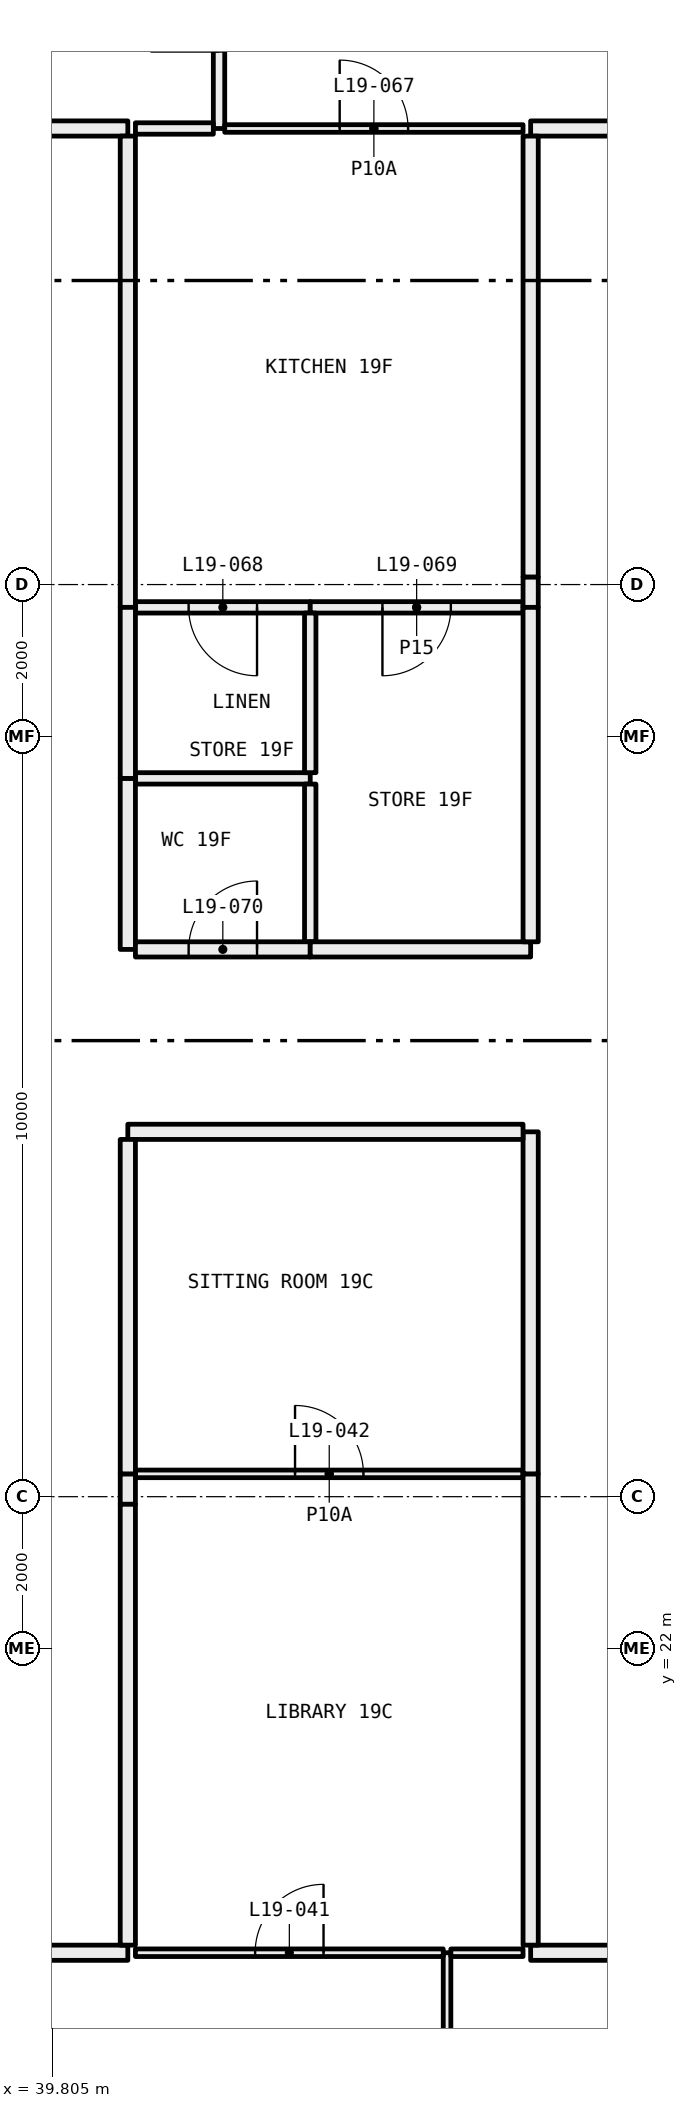
"""IFC4 building model, lengths in metres.
Left out: names, types, materials, properties, quantities, classifications, styles, units other than length and angle.
Written with IfcOpenShell. Run it as: python <this file> out.ifc"""

import sys

from ifc_helpers import new_model, si_unit, direction, frame, frame_2d, origin, place, context, subcontext, project, spatial, rectangle, extrude, element, fill, save


model = new_model("IFC4")
c1 = context("Model", 3, precision=1e-05, world=origin(), true_north=direction((0.0, 1.0)))
c2 = subcontext(c1, "Body", "Model", "MODEL_VIEW")
j1 = project(units=[si_unit("LENGTHUNIT", "METRE"), si_unit("PLANEANGLEUNIT", "RADIAN")], contexts=[c1])
p1 = place(None, origin())
s1 = spatial("IfcSite", under=j1, at=p1, CompositionType="ELEMENT")
p2 = place(p1, origin())
s2 = spatial("IfcBuilding", under=s1, at=p2, CompositionType="ELEMENT")
p3 = place(p2, frame((0.0, 0.0, 78.3)))
s3 = spatial("IfcBuildingStorey", under=s2, at=p3, CompositionType="ELEMENT", Elevation=78.3)
p4 = place(p3, frame((45.0, 12.05, 0.0), z_axis=(0.0, 0.0, 1.0), x_axis=(0.0, 1.0, 0.0)))
e1 = element("IfcWall", 1, at=p4, inside=s3, PredefinedType="PARTITIONING", context=c2, shape_type="SweptSolid", body=[
    extrude(rectangle(XDim=5.95, YDim=0.1, at=frame_2d((2.975, 0.0))), origin(), (0.0, 0.0, 1.0), 2.45),
])
p5 = place(p3, frame((44.95, 18.0, 0.0), z_axis=(0.0, 0.0, 1.0), x_axis=(-1.0, 0.0, 0.0)))
e2 = element("IfcWall", 2, at=p5, inside=s3, PredefinedType="PARTITIONING", context=c2, shape_type="SweptSolid", body=[
    extrude(rectangle(XDim=4.05, YDim=0.1, at=frame_2d((2.025, 0.0))), origin(), (0.0, 0.0, 1.0), 3.05),
])
p6 = place(p5, frame((1.575, 0.0, 0.0)))
e3 = element("IfcOpeningElement", 3, at=p6, cuts=e2, PredefinedType="OPENING", context=c2, shape_type="SweptSolid", body=[
    extrude(rectangle(XDim=0.9, YDim=2.1, at=frame_2d((0.45, 1.05))), frame((0.0, 0.06, 0.0), z_axis=(0.0, -1.0, 0.0), x_axis=(1.0, 0.0, 0.0)), (0.0, 0.0, 1.0), 0.12),
])
p7 = place(p3, frame((40.8, 18.0, 0.0), z_axis=(0.0, 0.0, 1.0), x_axis=(-1.0, 0.0, 0.0)))
e4 = element("IfcWall", 4, at=p7, inside=s3, PredefinedType="PARTITIONING", context=c2, shape_type="SweptSolid", body=[
    extrude(rectangle(XDim=2.3, YDim=0.2, at=frame_2d((1.15, 0.0))), origin(), (0.0, 0.0, 1.0), 3.05),
])
p8 = place(p3, frame((46.0, 18.0, 0.0), z_axis=(0.0, 0.0, 1.0), x_axis=(-1.0, 0.0, 0.0)))
e5 = element("IfcWall", 5, at=p8, inside=s3, PredefinedType="PARTITIONING", context=c2, shape_type="SweptSolid", body=[
    extrude(rectangle(XDim=0.95, YDim=0.1, at=frame_2d((0.475, 0.0))), origin(), (0.0, 0.0, 1.0), 3.05),
])
p9 = place(p3, frame((52.5, 18.0, 0.0), z_axis=(0.0, 0.0, 1.0), x_axis=(-1.0, 0.0, 0.0)))
e6 = element("IfcWall", 6, at=p9, inside=s3, PredefinedType="PARTITIONING", context=c2, shape_type="SweptSolid", body=[
    extrude(rectangle(XDim=6.4, YDim=0.2, at=frame_2d((3.2, 0.0))), origin(), (0.0, 0.0, 1.0), 3.05),
])
p10 = place(p3, frame((46.0, 24.3, 0.0), z_axis=(0.0, 0.0, 1.0), x_axis=(-1.0, 0.0, 0.0)))
e7 = element("IfcWall", 7, at=p10, inside=s3, PredefinedType="PARTITIONING", context=c2, shape_type="SweptSolid", body=[
    extrude(rectangle(XDim=5.1, YDim=0.1, at=frame_2d((2.55, 0.0))), origin(), (0.0, 0.0, 1.0), 3.05),
])
p11 = place(p10, frame((2.1, 0.0, 0.0)))
e8 = element("IfcOpeningElement", 8, at=p11, cuts=e7, PredefinedType="OPENING", context=c2, shape_type="SweptSolid", body=[
    extrude(rectangle(XDim=0.9, YDim=2.1, at=frame_2d((0.45, 1.05))), frame((0.0, 0.06, 0.0), z_axis=(0.0, -1.0, 0.0), x_axis=(1.0, 0.0, 0.0)), (0.0, 0.0, 1.0), 0.12),
])
p12 = place(p3, frame((40.8, 24.3, 0.0), z_axis=(0.0, 0.0, 1.0), x_axis=(0.0, -1.0, 0.0)))
e9 = element("IfcWall", 9, at=p12, inside=s3, PredefinedType="PARTITIONING", context=c2, shape_type="SweptSolid", body=[
    extrude(rectangle(XDim=0.4, YDim=0.2, at=frame_2d((0.2, 0.0))), origin(), (0.0, 0.0, 1.0), 2.45),
])
p13 = place(p3, frame((40.8, 23.9, 0.0), z_axis=(0.0, 0.0, 1.0), x_axis=(0.0, -1.0, 0.0)))
e10 = element("IfcWall", 10, at=p13, inside=s3, PredefinedType="PARTITIONING", context=c2, shape_type="SweptSolid", body=[
    extrude(rectangle(XDim=5.8, YDim=0.2, at=frame_2d((2.9, 0.0))), origin(), (0.0, 0.0, 1.0), 3.05),
])
p14 = place(p3, frame((46.1, 18.1, 0.0), z_axis=(0.0, 0.0, 1.0), x_axis=(0.0, 1.0, 0.0)))
e11 = element("IfcWall", 11, at=p14, inside=s3, PredefinedType="PARTITIONING", context=c2, shape_type="SweptSolid", body=[
    extrude(rectangle(XDim=6.2, YDim=0.2, at=frame_2d((3.1, 0.0))), origin(), (0.0, 0.0, 1.0), 2.45),
])
p15 = place(p3, frame((46.1, 24.3, 0.0), z_axis=(0.0, 0.0, 1.0), x_axis=(0.0, 1.0, 0.0)))
e12 = element("IfcWall", 12, at=p15, inside=s3, PredefinedType="PARTITIONING", context=c2, shape_type="SweptSolid", body=[
    extrude(rectangle(XDim=4.5, YDim=0.2, at=frame_2d((2.25, 0.0))), origin(), (0.0, 0.0, 1.0), 3.05),
])
p16 = place(p3, frame((46.0, 28.8, 0.0), z_axis=(0.0, 0.0, 1.0), x_axis=(-1.0, 0.0, 0.0)))
e13 = element("IfcWall", 13, at=p16, inside=s3, PredefinedType="PARTITIONING", context=c2, shape_type="SweptSolid", body=[
    extrude(rectangle(XDim=5.2, YDim=0.2, at=frame_2d((2.6, 0.0))), origin(), (0.0, 0.0, 1.0), 3.05),
])
p17 = place(p3, frame((40.8, 28.7, 0.0), z_axis=(0.0, 0.0, 1.0), x_axis=(0.0, -1.0, 0.0)))
e14 = element("IfcWall", 14, at=p17, inside=s3, PredefinedType="PARTITIONING", context=c2, shape_type="SweptSolid", body=[
    extrude(rectangle(XDim=4.4, YDim=0.2, at=frame_2d((2.2, 0.0))), origin(), (0.0, 0.0, 1.0), 3.05),
])
p18 = place(p3, frame((42.0, 42.0, 0.0), z_axis=(0.0, 0.0, 1.0), x_axis=(0.0, 1.0, 0.0)))
e15 = element("IfcWall", 15, at=p18, inside=s3, PredefinedType="PARTITIONING", context=c2, shape_type="SweptSolid", body=[
    extrude(rectangle(XDim=2.925, YDim=0.15, at=frame_2d((1.462, 0.0))), origin(), (0.0, 0.0, 1.0), 3.05),
])
p19 = place(p18, frame((1.012, 0.0, 0.0)))
e16 = element("IfcOpeningElement", 16, at=p19, cuts=e15, PredefinedType="OPENING", context=c2, shape_type="SweptSolid", body=[
    extrude(rectangle(XDim=0.9, YDim=2.1, at=frame_2d((0.45, 1.05))), frame((0.0, 0.085, 0.0), z_axis=(0.0, -1.0, 0.0), x_axis=(1.0, 0.0, 0.0)), (0.0, 0.0, 1.0), 0.17),
])
p20 = place(p3, frame((40.9, 42.0, 0.0), z_axis=(0.0, 0.0, 1.0), x_axis=(1.0, 0.0, 0.0)))
e17 = element("IfcWall", 17, at=p20, inside=s3, PredefinedType="PARTITIONING", context=c2, shape_type="SweptSolid", body=[
    extrude(rectangle(XDim=1.025, YDim=0.15, at=frame_2d((0.513, 0.0))), origin(), (0.0, 0.0, 1.0), 3.05),
])
p21 = place(p3, frame((38.5, 42.0, 0.0), z_axis=(0.0, 0.0, 1.0), x_axis=(1.0, 0.0, 0.0)))
e18 = element("IfcWall", 18, at=p21, inside=s3, PredefinedType="PARTITIONING", context=c2, shape_type="SweptSolid", body=[
    extrude(rectangle(XDim=2.3, YDim=0.2, at=frame_2d((1.15, 0.0))), origin(), (0.0, 0.0, 1.0), 3.05),
])
p22 = place(p3, frame((42.075, 42.0, 0.0), z_axis=(0.0, 0.0, 1.0), x_axis=(1.0, 0.0, 0.0)))
e19 = element("IfcWall", 19, at=p22, inside=s3, PredefinedType="PARTITIONING", context=c2, shape_type="SweptSolid", body=[
    extrude(rectangle(XDim=3.925, YDim=0.1, at=frame_2d((1.962, 0.0))), origin(), (0.0, 0.0, 1.0), 3.05),
])
p23 = place(p22, frame((1.512, 0.0, 0.0)))
e20 = element("IfcOpeningElement", 20, at=p23, cuts=e19, PredefinedType="OPENING", context=c2, shape_type="SweptSolid", body=[
    extrude(rectangle(XDim=0.9, YDim=2.1, at=frame_2d((0.45, 1.05))), frame((0.0, 0.06, 0.0), z_axis=(0.0, -1.0, 0.0), x_axis=(1.0, 0.0, 0.0)), (0.0, 0.0, 1.0), 0.12),
])
p24 = place(p3, frame((46.1, 42.0, 0.0), z_axis=(0.0, 0.0, 1.0), x_axis=(1.0, 0.0, 0.0)))
e21 = element("IfcWall", 21, at=p24, inside=s3, PredefinedType="PARTITIONING", context=c2, shape_type="SweptSolid", body=[
    extrude(rectangle(XDim=1.9, YDim=0.2, at=frame_2d((0.95, 0.0))), origin(), (0.0, 0.0, 1.0), 3.05),
])
p25 = place(p3, frame((40.9, 35.7, 0.0), z_axis=(0.0, 0.0, 1.0), x_axis=(1.0, 0.0, 0.0)))
e22 = element("IfcWall", 22, at=p25, inside=s3, PredefinedType="PARTITIONING", context=c2, shape_type="SweptSolid", body=[
    extrude(rectangle(XDim=2.3, YDim=0.15, at=frame_2d((1.15, 0.0))), origin(), (0.0, 0.0, 1.0), 3.05),
])
p26 = place(p25, frame((0.7, 0.0, 0.0)))
e23 = element("IfcOpeningElement", 23, at=p26, cuts=e22, PredefinedType="OPENING", context=c2, shape_type="SweptSolid", body=[
    extrude(rectangle(XDim=0.9, YDim=2.1, at=frame_2d((0.45, 1.05))), frame((0.0, 0.085, 0.0), z_axis=(0.0, -1.0, 0.0), x_axis=(1.0, 0.0, 0.0)), (0.0, 0.0, 1.0), 0.17),
])
p27 = place(p3, frame((43.2, 35.7, 0.0), z_axis=(0.0, 0.0, 1.0), x_axis=(1.0, 0.0, 0.0)))
e24 = element("IfcWall", 24, at=p27, inside=s3, PredefinedType="PARTITIONING", context=c2, shape_type="SweptSolid", body=[
    extrude(rectangle(XDim=2.8, YDim=0.15, at=frame_2d((1.4, 0.0))), origin(), (0.0, 0.0, 1.0), 3.05),
])
p28 = place(p27, frame((0.95, 0.0, 0.0)))
e25 = element("IfcOpeningElement", 25, at=p28, cuts=e24, PredefinedType="OPENING", context=c2, shape_type="SweptSolid", body=[
    extrude(rectangle(XDim=0.9, YDim=2.1, at=frame_2d((0.45, 1.05))), frame((0.0, 0.085, 0.0), z_axis=(0.0, -1.0, 0.0), x_axis=(1.0, 0.0, 0.0)), (0.0, 0.0, 1.0), 0.17),
])
p29 = place(p3, frame((40.8, 41.9, 0.0), z_axis=(0.0, 0.0, 1.0), x_axis=(0.0, -1.0, 0.0)))
e26 = element("IfcWall", 26, at=p29, inside=s3, PredefinedType="PARTITIONING", context=c2, shape_type="SweptSolid", body=[
    extrude(rectangle(XDim=6.2, YDim=0.2, at=frame_2d((3.1, 0.0))), origin(), (0.0, 0.0, 1.0), 2.45),
])
p30 = place(p3, frame((46.1, 35.7, 0.0), z_axis=(0.0, 0.0, 1.0), x_axis=(0.0, 1.0, 0.0)))
e27 = element("IfcWall", 27, at=p30, inside=s3, PredefinedType="PARTITIONING", context=c2, shape_type="SweptSolid", body=[
    extrude(rectangle(XDim=0.4, YDim=0.2, at=frame_2d((0.2, 0.0))), origin(), (0.0, 0.0, 1.0), 2.45),
])
p31 = place(p3, frame((46.1, 36.1, 0.0), z_axis=(0.0, 0.0, 1.0), x_axis=(0.0, 1.0, 0.0)))
e28 = element("IfcWall", 28, at=p31, inside=s3, PredefinedType="PARTITIONING", context=c2, shape_type="SweptSolid", body=[
    extrude(rectangle(XDim=5.8, YDim=0.2, at=frame_2d((2.9, 0.0))), origin(), (0.0, 0.0, 1.0), 3.05),
])
p32 = place(p3, frame((43.2, 33.45, 0.0), z_axis=(0.0, 0.0, 1.0), x_axis=(-1.0, 0.0, 0.0)))
e29 = element("IfcWall", 29, at=p32, inside=s3, PredefinedType="PARTITIONING", context=c2, shape_type="SweptSolid", body=[
    extrude(rectangle(XDim=2.3, YDim=0.15, at=frame_2d((1.15, 0.0))), origin(), (0.0, 0.0, 1.0), 3.05),
])
p33 = place(p3, frame((43.2, 31.3, 0.0), z_axis=(0.0, 0.0, 1.0), x_axis=(0.0, 1.0, 0.0)))
e30 = element("IfcWall", 30, at=p33, inside=s3, PredefinedType="PARTITIONING", context=c2, shape_type="SweptSolid", body=[
    extrude(rectangle(XDim=2.075, YDim=0.15, at=frame_2d((1.038, 0.0))), origin(), (0.0, 0.0, 1.0), 3.05),
])
p34 = place(p3, frame((40.8, 33.45, 0.0), z_axis=(0.0, 0.0, 1.0), x_axis=(0.0, -1.0, 0.0)))
e31 = element("IfcWall", 31, at=p34, inside=s3, PredefinedType="PARTITIONING", context=c2, shape_type="SweptSolid", body=[
    extrude(rectangle(XDim=2.25, YDim=0.2, at=frame_2d((1.125, 0.0))), origin(), (0.0, 0.0, 1.0), 3.05),
])
p35 = place(p3, frame((40.9, 31.2, 0.0), z_axis=(0.0, 0.0, 1.0), x_axis=(1.0, 0.0, 0.0)))
e32 = element("IfcWall", 32, at=p35, inside=s3, PredefinedType="PARTITIONING", context=c2, shape_type="SweptSolid", body=[
    extrude(rectangle(XDim=2.3, YDim=0.2, at=frame_2d((1.15, 0.0))), origin(), (0.0, 0.0, 1.0), 3.05),
])
p36 = place(p35, frame((0.7, 0.0, 0.0)))
e33 = element("IfcOpeningElement", 33, at=p36, cuts=e32, PredefinedType="OPENING", context=c2, shape_type="SweptSolid", body=[
    extrude(rectangle(XDim=0.9, YDim=2.1, at=frame_2d((0.45, 1.05))), frame((0.0, 0.11, 0.0), z_axis=(0.0, -1.0, 0.0), x_axis=(1.0, 0.0, 0.0)), (0.0, 0.0, 1.0), 0.22),
])
p37 = place(p3, frame((43.2, 33.525, 0.0), z_axis=(0.0, 0.0, 1.0), x_axis=(0.0, 1.0, 0.0)))
e34 = element("IfcWall", 34, at=p37, inside=s3, PredefinedType="PARTITIONING", context=c2, shape_type="SweptSolid", body=[
    extrude(rectangle(XDim=2.1, YDim=0.15, at=frame_2d((1.05, 0.0))), origin(), (0.0, 0.0, 1.0), 3.05),
])
p38 = place(p3, frame((40.8, 35.7, 0.0), z_axis=(0.0, 0.0, 1.0), x_axis=(0.0, -1.0, 0.0)))
e35 = element("IfcWall", 35, at=p38, inside=s3, PredefinedType="PARTITIONING", context=c2, shape_type="SweptSolid", body=[
    extrude(rectangle(XDim=2.25, YDim=0.2, at=frame_2d((1.125, 0.0))), origin(), (0.0, 0.0, 1.0), 3.05),
])
p39 = place(p3, frame((43.2, 31.2, 0.0), z_axis=(0.0, 0.0, 1.0), x_axis=(1.0, 0.0, 0.0)))
e36 = element("IfcWall", 36, at=p39, inside=s3, PredefinedType="PARTITIONING", context=c2, shape_type="SweptSolid", body=[
    extrude(rectangle(XDim=2.9, YDim=0.2, at=frame_2d((1.45, 0.0))), origin(), (0.0, 0.0, 1.0), 3.05),
])
p40 = place(p3, frame((46.1, 31.3, 0.0), z_axis=(0.0, 0.0, 1.0), x_axis=(0.0, 1.0, 0.0)))
e37 = element("IfcWall", 37, at=p40, inside=s3, PredefinedType="PARTITIONING", context=c2, shape_type="SweptSolid", body=[
    extrude(rectangle(XDim=4.4, YDim=0.2, at=frame_2d((2.2, 0.0))), origin(), (0.0, 0.0, 1.0), 3.05),
])
p41 = place(p6, frame((0.9, 0.0, 0.0), x_axis=(-1.0, 0.0, 0.0)))
e38 = element("IfcDoor", 38, at=p41, inside=s3, OperationType="SINGLE_SWING_LEFT", PredefinedType="DOOR", context=c2, shape_type="SweptSolid", body=[
    extrude(rectangle(XDim=0.9, YDim=2.1, at=frame_2d((0.45, 1.05))), frame((0.0, 0.025, 0.0), z_axis=(0.0, -1.0, 0.0), x_axis=(1.0, 0.0, 0.0)), (0.0, 0.0, 1.0), 0.05),
])
fill(e3, e38)
p42 = place(p11, frame((0.9, 0.0, 0.0), x_axis=(-1.0, 0.0, 0.0)))
e39 = element("IfcDoor", 39, at=p42, inside=s3, OperationType="SINGLE_SWING_RIGHT", PredefinedType="DOOR", context=c2, shape_type="SweptSolid", body=[
    extrude(rectangle(XDim=0.9, YDim=2.1, at=frame_2d((0.45, 1.05))), frame((0.0, 0.025, 0.0), z_axis=(0.0, -1.0, 0.0), x_axis=(1.0, 0.0, 0.0)), (0.0, 0.0, 1.0), 0.05),
])
fill(e8, e39)
p43 = place(p23, origin())
e40 = element("IfcDoor", 40, at=p43, inside=s3, OperationType="SINGLE_SWING_RIGHT", PredefinedType="DOOR", context=c2, shape_type="SweptSolid", body=[
    extrude(rectangle(XDim=0.9, YDim=2.1, at=frame_2d((0.45, 1.05))), frame((0.0, 0.025, 0.0), z_axis=(0.0, -1.0, 0.0), x_axis=(1.0, 0.0, 0.0)), (0.0, 0.0, 1.0), 0.05),
])
fill(e20, e40)
p44 = place(p26, frame((0.9, 0.0, 0.0), x_axis=(-1.0, 0.0, 0.0)))
e41 = element("IfcDoor", 41, at=p44, inside=s3, OperationType="SINGLE_SWING_RIGHT", PredefinedType="DOOR", context=c2, shape_type="SweptSolid", body=[
    extrude(rectangle(XDim=0.9, YDim=2.1, at=frame_2d((0.45, 1.05))), frame((0.0, 0.025, 0.0), z_axis=(0.0, -1.0, 0.0), x_axis=(1.0, 0.0, 0.0)), (0.0, 0.0, 1.0), 0.05),
])
fill(e23, e41)
p45 = place(p28, frame((0.9, 0.0, 0.0), x_axis=(-1.0, 0.0, 0.0)))
e42 = element("IfcDoor", 42, at=p45, inside=s3, OperationType="SINGLE_SWING_LEFT", PredefinedType="DOOR", context=c2, shape_type="SweptSolid", body=[
    extrude(rectangle(XDim=0.9, YDim=2.1, at=frame_2d((0.45, 1.05))), frame((0.0, 0.025, 0.0), z_axis=(0.0, -1.0, 0.0), x_axis=(1.0, 0.0, 0.0)), (0.0, 0.0, 1.0), 0.05),
])
fill(e25, e42)
p46 = place(p36, origin())
e43 = element("IfcDoor", 43, at=p46, inside=s3, OperationType="SINGLE_SWING_LEFT", PredefinedType="DOOR", context=c2, shape_type="SweptSolid", body=[
    extrude(rectangle(XDim=0.9, YDim=2.1, at=frame_2d((0.45, 1.05))), frame((0.0, 0.025, 0.0), z_axis=(0.0, -1.0, 0.0), x_axis=(1.0, 0.0, 0.0)), (0.0, 0.0, 1.0), 0.05),
])
fill(e33, e43)
save(model, sys.argv[1])
